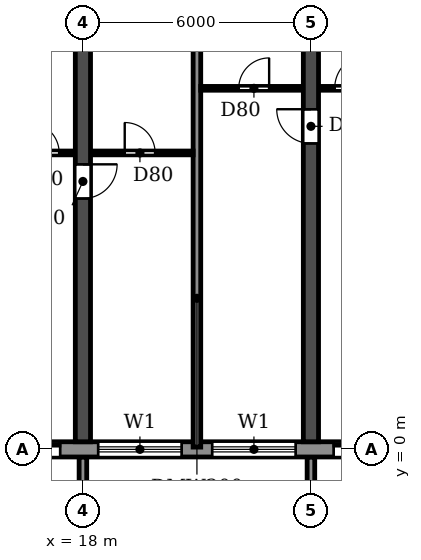
"""IFC4 building model, lengths in metres.
Left out: names, types, materials, properties, quantities, classifications, styles, units other than length and angle.
Written with IfcOpenShell. Run it as: python <this file> out.ifc"""

import sys

from ifc_helpers import new_model, si_unit, direction, frame, frame_2d, origin, place, context, subcontext, project, spatial, polyline, rectangle, outline, extrude, source, transform, mapped, element, fill, save


model = new_model("IFC4")
c1 = context("Model", 3, precision=1e-05, world=origin(), true_north=direction((0.0, 1.0)))
c2 = subcontext(c1, "Body", "Model", "MODEL_VIEW")
j1 = project(units=[si_unit("LENGTHUNIT", "METRE"), si_unit("PLANEANGLEUNIT", "RADIAN")], contexts=[c1])
p1 = place(None, origin())
s1 = spatial("IfcSite", under=j1, at=p1, CompositionType="ELEMENT")
p2 = place(p1, origin())
s2 = spatial("IfcBuilding", under=s1, at=p2, CompositionType="ELEMENT")
p3 = place(p2, frame((0.0, 0.0, 49.8)))
s3 = spatial("IfcBuildingStorey", under=s2, at=p3, CompositionType="ELEMENT", Elevation=49.8)
p4 = place(p3, frame((18.0, 0.2, 0.0), z_axis=(0.0, 0.0, 1.0), x_axis=(0.0, 1.0, 0.0)))
e1 = element("IfcWall", 1, at=p4, inside=s3, PredefinedType="SHEAR", context=c2, shape_type="SweptSolid", body=[
    extrude(rectangle(XDim=11.65, YDim=0.4, at=frame_2d((5.825, 0.0))), origin(), (0.0, 0.0, 1.0), 3.0),
])
p5 = place(p4, frame((6.4, 0.0, 0.0)))
e2 = element("IfcOpeningElement", 2, at=p5, cuts=e1, PredefinedType="OPENING", context=c2, shape_type="SweptSolid", body=[
    extrude(rectangle(XDim=0.9, YDim=2.1, at=frame_2d((0.45, 1.05))), frame((0.0, 0.21, 0.0), z_axis=(0.0, -1.0, 0.0), x_axis=(1.0, 0.0, 0.0)), (0.0, 0.0, 1.0), 0.42),
])
p6 = place(p3, frame((24.0, 0.2, 0.0), z_axis=(0.0, 0.0, 1.0), x_axis=(0.0, 1.0, 0.0)))
e3 = element("IfcWall", 3, at=p6, inside=s3, PredefinedType="SHEAR", context=c2, shape_type="SweptSolid", body=[
    extrude(rectangle(XDim=11.65, YDim=0.4, at=frame_2d((5.825, 0.0))), origin(), (0.0, 0.0, 1.0), 3.0),
])
p7 = place(p6, frame((7.85, 0.0, 0.0)))
e4 = element("IfcOpeningElement", 4, at=p7, cuts=e3, PredefinedType="OPENING", context=c2, shape_type="SweptSolid", body=[
    extrude(rectangle(XDim=0.9, YDim=2.1, at=frame_2d((0.45, 1.05))), frame((0.0, 0.21, 0.0), z_axis=(0.0, -1.0, 0.0), x_axis=(1.0, 0.0, 0.0)), (0.0, 0.0, 1.0), 0.42),
])
p8 = place(p3, frame((4.683, 0.0, 0.0), z_axis=(0.0, 0.0, 1.0), x_axis=(1.0, 0.0, 0.0)))
e5 = element("IfcWall", 5, at=p8, inside=s3, PredefinedType="STANDARD", context=c2, shape_type="SweptSolid", body=[
    extrude(rectangle(XDim=92.634, YDim=0.4, at=frame_2d((46.317, 0.0))), origin(), (0.0, 0.0, 1.0), 3.0),
])
p9 = place(p8, frame((1.717, 0.0, 0.9)))
e6 = element("IfcOpeningElement", 6, at=p9, cuts=e5, PredefinedType="OPENING", context=c2, shape_type="SweptSolid", body=[
    extrude(rectangle(XDim=2.2, YDim=1.5, at=frame_2d((1.1, 0.75))), frame((0.0, 0.21, 0.0), z_axis=(0.0, -1.0, 0.0), x_axis=(1.0, 0.0, 0.0)), (0.0, 0.0, 1.0), 0.42),
])
p10 = place(p8, frame((4.717, 0.0, 0.9)))
e7 = element("IfcOpeningElement", 7, at=p10, cuts=e5, PredefinedType="OPENING", context=c2, shape_type="SweptSolid", body=[
    extrude(rectangle(XDim=2.2, YDim=1.5, at=frame_2d((1.1, 0.75))), frame((0.0, 0.21, 0.0), z_axis=(0.0, -1.0, 0.0), x_axis=(1.0, 0.0, 0.0)), (0.0, 0.0, 1.0), 0.42),
])
p11 = place(p8, frame((7.717, 0.0, 0.9)))
e8 = element("IfcOpeningElement", 8, at=p11, cuts=e5, PredefinedType="OPENING", context=c2, shape_type="SweptSolid", body=[
    extrude(rectangle(XDim=2.2, YDim=1.5, at=frame_2d((1.1, 0.75))), frame((0.0, 0.21, 0.0), z_axis=(0.0, -1.0, 0.0), x_axis=(1.0, 0.0, 0.0)), (0.0, 0.0, 1.0), 0.42),
])
p12 = place(p8, frame((10.917, 0.0, 0.0)))
e9 = element("IfcOpeningElement", 9, at=p12, cuts=e5, PredefinedType="OPENING", context=c2, shape_type="SweptSolid", body=[
    extrude(rectangle(XDim=1.8, YDim=2.4, at=frame_2d((0.9, 1.2))), frame((0.0, 0.21, 0.0), z_axis=(0.0, -1.0, 0.0), x_axis=(1.0, 0.0, 0.0)), (0.0, 0.0, 1.0), 0.42),
])
p13 = place(p8, frame((13.717, 0.0, 0.9)))
e10 = element("IfcOpeningElement", 10, at=p13, cuts=e5, PredefinedType="OPENING", context=c2, shape_type="SweptSolid", body=[
    extrude(rectangle(XDim=2.2, YDim=1.5, at=frame_2d((1.1, 0.75))), frame((0.0, 0.21, 0.0), z_axis=(0.0, -1.0, 0.0), x_axis=(1.0, 0.0, 0.0)), (0.0, 0.0, 1.0), 0.42),
])
p14 = place(p8, frame((16.717, 0.0, 0.9)))
e11 = element("IfcOpeningElement", 11, at=p14, cuts=e5, PredefinedType="OPENING", context=c2, shape_type="SweptSolid", body=[
    extrude(rectangle(XDim=2.2, YDim=1.5, at=frame_2d((1.1, 0.75))), frame((0.0, 0.21, 0.0), z_axis=(0.0, -1.0, 0.0), x_axis=(1.0, 0.0, 0.0)), (0.0, 0.0, 1.0), 0.42),
])
p15 = place(p8, frame((19.917, 0.0, 0.0)))
e12 = element("IfcOpeningElement", 12, at=p15, cuts=e5, PredefinedType="OPENING", context=c2, shape_type="SweptSolid", body=[
    extrude(rectangle(XDim=1.8, YDim=2.4, at=frame_2d((0.9, 1.2))), frame((0.0, 0.21, 0.0), z_axis=(0.0, -1.0, 0.0), x_axis=(1.0, 0.0, 0.0)), (0.0, 0.0, 1.0), 0.42),
])
p16 = place(p8, frame((22.717, 0.0, 0.9)))
e13 = element("IfcOpeningElement", 13, at=p16, cuts=e5, PredefinedType="OPENING", context=c2, shape_type="SweptSolid", body=[
    extrude(rectangle(XDim=2.2, YDim=1.5, at=frame_2d((1.1, 0.75))), frame((0.0, 0.21, 0.0), z_axis=(0.0, -1.0, 0.0), x_axis=(1.0, 0.0, 0.0)), (0.0, 0.0, 1.0), 0.42),
])
p17 = place(p8, frame((25.717, 0.0, 0.9)))
e14 = element("IfcOpeningElement", 14, at=p17, cuts=e5, PredefinedType="OPENING", context=c2, shape_type="SweptSolid", body=[
    extrude(rectangle(XDim=2.2, YDim=1.5, at=frame_2d((1.1, 0.75))), frame((0.0, 0.21, 0.0), z_axis=(0.0, -1.0, 0.0), x_axis=(1.0, 0.0, 0.0)), (0.0, 0.0, 1.0), 0.42),
])
p18 = place(p8, frame((28.717, 0.0, 0.9)))
e15 = element("IfcOpeningElement", 15, at=p18, cuts=e5, PredefinedType="OPENING", context=c2, shape_type="SweptSolid", body=[
    extrude(rectangle(XDim=2.2, YDim=1.5, at=frame_2d((1.1, 0.75))), frame((0.0, 0.21, 0.0), z_axis=(0.0, -1.0, 0.0), x_axis=(1.0, 0.0, 0.0)), (0.0, 0.0, 1.0), 0.42),
])
p19 = place(p8, frame((31.717, 0.0, 0.9)))
e16 = element("IfcOpeningElement", 16, at=p19, cuts=e5, PredefinedType="OPENING", context=c2, shape_type="SweptSolid", body=[
    extrude(rectangle(XDim=2.2, YDim=1.5, at=frame_2d((1.1, 0.75))), frame((0.0, 0.21, 0.0), z_axis=(0.0, -1.0, 0.0), x_axis=(1.0, 0.0, 0.0)), (0.0, 0.0, 1.0), 0.42),
])
p20 = place(p8, frame((34.917, 0.0, 0.0)))
e17 = element("IfcOpeningElement", 17, at=p20, cuts=e5, PredefinedType="OPENING", context=c2, shape_type="SweptSolid", body=[
    extrude(rectangle(XDim=1.8, YDim=2.4, at=frame_2d((0.9, 1.2))), frame((0.0, 0.21, 0.0), z_axis=(0.0, -1.0, 0.0), x_axis=(1.0, 0.0, 0.0)), (0.0, 0.0, 1.0), 0.42),
])
p21 = place(p8, frame((37.717, 0.0, 0.9)))
e18 = element("IfcOpeningElement", 18, at=p21, cuts=e5, PredefinedType="OPENING", context=c2, shape_type="SweptSolid", body=[
    extrude(rectangle(XDim=2.2, YDim=1.5, at=frame_2d((1.1, 0.75))), frame((0.0, 0.21, 0.0), z_axis=(0.0, -1.0, 0.0), x_axis=(1.0, 0.0, 0.0)), (0.0, 0.0, 1.0), 0.42),
])
p22 = place(p8, frame((40.717, 0.0, 0.9)))
e19 = element("IfcOpeningElement", 19, at=p22, cuts=e5, PredefinedType="OPENING", context=c2, shape_type="SweptSolid", body=[
    extrude(rectangle(XDim=2.2, YDim=1.5, at=frame_2d((1.1, 0.75))), frame((0.0, 0.21, 0.0), z_axis=(0.0, -1.0, 0.0), x_axis=(1.0, 0.0, 0.0)), (0.0, 0.0, 1.0), 0.42),
])
p23 = place(p8, frame((43.717, 0.0, 0.9)))
e20 = element("IfcOpeningElement", 20, at=p23, cuts=e5, PredefinedType="OPENING", context=c2, shape_type="SweptSolid", body=[
    extrude(rectangle(XDim=2.2, YDim=1.5, at=frame_2d((1.1, 0.75))), frame((0.0, 0.21, 0.0), z_axis=(0.0, -1.0, 0.0), x_axis=(1.0, 0.0, 0.0)), (0.0, 0.0, 1.0), 0.42),
])
p24 = place(p8, frame((46.917, 0.0, 0.0)))
e21 = element("IfcOpeningElement", 21, at=p24, cuts=e5, PredefinedType="OPENING", context=c2, shape_type="SweptSolid", body=[
    extrude(rectangle(XDim=1.8, YDim=2.4, at=frame_2d((0.9, 1.2))), frame((0.0, 0.21, 0.0), z_axis=(0.0, -1.0, 0.0), x_axis=(1.0, 0.0, 0.0)), (0.0, 0.0, 1.0), 0.42),
])
p25 = place(p8, frame((49.717, 0.0, 0.9)))
e22 = element("IfcOpeningElement", 22, at=p25, cuts=e5, PredefinedType="OPENING", context=c2, shape_type="SweptSolid", body=[
    extrude(rectangle(XDim=2.2, YDim=1.5, at=frame_2d((1.1, 0.75))), frame((0.0, 0.21, 0.0), z_axis=(0.0, -1.0, 0.0), x_axis=(1.0, 0.0, 0.0)), (0.0, 0.0, 1.0), 0.42),
])
p26 = place(p8, frame((52.717, 0.0, 0.9)))
e23 = element("IfcOpeningElement", 23, at=p26, cuts=e5, PredefinedType="OPENING", context=c2, shape_type="SweptSolid", body=[
    extrude(rectangle(XDim=2.2, YDim=1.5, at=frame_2d((1.1, 0.75))), frame((0.0, 0.21, 0.0), z_axis=(0.0, -1.0, 0.0), x_axis=(1.0, 0.0, 0.0)), (0.0, 0.0, 1.0), 0.42),
])
p27 = place(p8, frame((55.717, 0.0, 0.9)))
e24 = element("IfcOpeningElement", 24, at=p27, cuts=e5, PredefinedType="OPENING", context=c2, shape_type="SweptSolid", body=[
    extrude(rectangle(XDim=2.2, YDim=1.5, at=frame_2d((1.1, 0.75))), frame((0.0, 0.21, 0.0), z_axis=(0.0, -1.0, 0.0), x_axis=(1.0, 0.0, 0.0)), (0.0, 0.0, 1.0), 0.42),
])
p28 = place(p8, frame((58.917, 0.0, 0.0)))
e25 = element("IfcOpeningElement", 25, at=p28, cuts=e5, PredefinedType="OPENING", context=c2, shape_type="SweptSolid", body=[
    extrude(rectangle(XDim=1.8, YDim=2.4, at=frame_2d((0.9, 1.2))), frame((0.0, 0.21, 0.0), z_axis=(0.0, -1.0, 0.0), x_axis=(1.0, 0.0, 0.0)), (0.0, 0.0, 1.0), 0.42),
])
p29 = place(p8, frame((61.717, 0.0, 0.9)))
e26 = element("IfcOpeningElement", 26, at=p29, cuts=e5, PredefinedType="OPENING", context=c2, shape_type="SweptSolid", body=[
    extrude(rectangle(XDim=2.2, YDim=1.5, at=frame_2d((1.1, 0.75))), frame((0.0, 0.21, 0.0), z_axis=(0.0, -1.0, 0.0), x_axis=(1.0, 0.0, 0.0)), (0.0, 0.0, 1.0), 0.42),
])
p30 = place(p8, frame((64.717, 0.0, 0.9)))
e27 = element("IfcOpeningElement", 27, at=p30, cuts=e5, PredefinedType="OPENING", context=c2, shape_type="SweptSolid", body=[
    extrude(rectangle(XDim=2.2, YDim=1.5, at=frame_2d((1.1, 0.75))), frame((0.0, 0.21, 0.0), z_axis=(0.0, -1.0, 0.0), x_axis=(1.0, 0.0, 0.0)), (0.0, 0.0, 1.0), 0.42),
])
p31 = place(p8, frame((67.717, 0.0, 0.9)))
e28 = element("IfcOpeningElement", 28, at=p31, cuts=e5, PredefinedType="OPENING", context=c2, shape_type="SweptSolid", body=[
    extrude(rectangle(XDim=2.2, YDim=1.5, at=frame_2d((1.1, 0.75))), frame((0.0, 0.21, 0.0), z_axis=(0.0, -1.0, 0.0), x_axis=(1.0, 0.0, 0.0)), (0.0, 0.0, 1.0), 0.42),
])
p32 = place(p8, frame((70.917, 0.0, 0.0)))
e29 = element("IfcOpeningElement", 29, at=p32, cuts=e5, PredefinedType="OPENING", context=c2, shape_type="SweptSolid", body=[
    extrude(rectangle(XDim=1.8, YDim=2.4, at=frame_2d((0.9, 1.2))), frame((0.0, 0.21, 0.0), z_axis=(0.0, -1.0, 0.0), x_axis=(1.0, 0.0, 0.0)), (0.0, 0.0, 1.0), 0.42),
])
p33 = place(p8, frame((73.717, 0.0, 0.9)))
e30 = element("IfcOpeningElement", 30, at=p33, cuts=e5, PredefinedType="OPENING", context=c2, shape_type="SweptSolid", body=[
    extrude(rectangle(XDim=2.2, YDim=1.5, at=frame_2d((1.1, 0.75))), frame((0.0, 0.21, 0.0), z_axis=(0.0, -1.0, 0.0), x_axis=(1.0, 0.0, 0.0)), (0.0, 0.0, 1.0), 0.42),
])
p34 = place(p8, frame((76.717, 0.0, 0.9)))
e31 = element("IfcOpeningElement", 31, at=p34, cuts=e5, PredefinedType="OPENING", context=c2, shape_type="SweptSolid", body=[
    extrude(rectangle(XDim=2.2, YDim=1.5, at=frame_2d((1.1, 0.75))), frame((0.0, 0.21, 0.0), z_axis=(0.0, -1.0, 0.0), x_axis=(1.0, 0.0, 0.0)), (0.0, 0.0, 1.0), 0.42),
])
p35 = place(p8, frame((79.717, 0.0, 0.9)))
e32 = element("IfcOpeningElement", 32, at=p35, cuts=e5, PredefinedType="OPENING", context=c2, shape_type="SweptSolid", body=[
    extrude(rectangle(XDim=2.2, YDim=1.5, at=frame_2d((1.1, 0.75))), frame((0.0, 0.21, 0.0), z_axis=(0.0, -1.0, 0.0), x_axis=(1.0, 0.0, 0.0)), (0.0, 0.0, 1.0), 0.42),
])
p36 = place(p8, frame((82.917, 0.0, 0.0)))
e33 = element("IfcOpeningElement", 33, at=p36, cuts=e5, PredefinedType="OPENING", context=c2, shape_type="SweptSolid", body=[
    extrude(rectangle(XDim=1.8, YDim=2.4, at=frame_2d((0.9, 1.2))), frame((0.0, 0.21, 0.0), z_axis=(0.0, -1.0, 0.0), x_axis=(1.0, 0.0, 0.0)), (0.0, 0.0, 1.0), 0.42),
])
p37 = place(p8, frame((85.717, 0.0, 0.9)))
e34 = element("IfcOpeningElement", 34, at=p37, cuts=e5, PredefinedType="OPENING", context=c2, shape_type="SweptSolid", body=[
    extrude(rectangle(XDim=2.2, YDim=1.5, at=frame_2d((1.1, 0.75))), frame((0.0, 0.21, 0.0), z_axis=(0.0, -1.0, 0.0), x_axis=(1.0, 0.0, 0.0)), (0.0, 0.0, 1.0), 0.42),
])
p38 = place(p8, frame((88.717, 0.0, 0.9)))
e35 = element("IfcOpeningElement", 35, at=p38, cuts=e5, PredefinedType="OPENING", context=c2, shape_type="SweptSolid", body=[
    extrude(rectangle(XDim=2.2, YDim=1.5, at=frame_2d((1.1, 0.75))), frame((0.0, 0.21, 0.0), z_axis=(0.0, -1.0, 0.0), x_axis=(1.0, 0.0, 0.0)), (0.0, 0.0, 1.0), 0.42),
])
m1 = source(origin(), c2, "Body", "SweptSolid", [
    extrude(outline(polyline([(0.0, 0.0), (0.2, 0.0), (0.2, 1.65), (0.0, 1.65), (0.0, 0.0)])), origin(), (0.0, 0.0, 1.0), 3.1),
])
for number, where in (
    (36, (17.9, -1.85, 0.0)),
    (37, (23.9, -1.85, 0.0)),
):
    element("IfcWall", number, at=place(p3, frame(where)), inside=s3, PredefinedType="STANDARD", context=c2, shape_type="MappedRepresentation", body=[
        mapped(m1, transform((0.0, 0.0, 0.0))),
    ])
p39 = place(p3, frame((21.0, 0.06, 0.0), z_axis=(0.0, 0.0, 1.0), x_axis=(0.0, 1.0, 0.0)))
e38 = element("IfcWall", 38, at=p39, inside=s3, PredefinedType="PARTITIONING", context=c2, shape_type="SweptSolid", body=[
    extrude(rectangle(XDim=11.78, YDim=0.2, at=frame_2d((5.89, 0.0))), origin(), (0.0, 0.0, 1.0), 3.0),
])
p40 = place(p3, frame((15.9, 7.8, 0.0), z_axis=(0.0, 0.0, 1.0), x_axis=(1.0, 0.0, 0.0)))
e39 = element("IfcWall", 39, at=p40, inside=s3, PredefinedType="PARTITIONING", context=c2, shape_type="SweptSolid", body=[
    extrude(rectangle(XDim=1.89, YDim=0.1, at=frame_2d((0.945, 0.0))), origin(), (0.0, 0.0, 1.0), 3.0),
])
p41 = place(p40, frame((0.675, 0.0, 0.0)))
e40 = element("IfcOpeningElement", 40, at=p41, cuts=e39, PredefinedType="OPENING", context=c2, shape_type="SweptSolid", body=[
    extrude(rectangle(XDim=0.8, YDim=2.1, at=frame_2d((0.4, 1.05))), frame((0.0, 0.06, 0.0), z_axis=(0.0, -1.0, 0.0), x_axis=(1.0, 0.0, 0.0)), (0.0, 0.0, 1.0), 0.12),
])
p42 = place(p3, frame((18.21, 7.8, 0.0), z_axis=(0.0, 0.0, 1.0), x_axis=(1.0, 0.0, 0.0)))
e41 = element("IfcWall", 41, at=p42, inside=s3, PredefinedType="PARTITIONING", context=c2, shape_type="SweptSolid", body=[
    extrude(rectangle(XDim=2.69, YDim=0.1, at=frame_2d((1.345, 0.0))), origin(), (0.0, 0.0, 1.0), 3.0),
])
p43 = place(p42, frame((0.89, 0.0, 0.0)))
e42 = element("IfcOpeningElement", 42, at=p43, cuts=e41, PredefinedType="OPENING", context=c2, shape_type="SweptSolid", body=[
    extrude(rectangle(XDim=0.8, YDim=2.1, at=frame_2d((0.4, 1.05))), frame((0.0, 0.06, 0.0), z_axis=(0.0, -1.0, 0.0), x_axis=(1.0, 0.0, 0.0)), (0.0, 0.0, 1.0), 0.12),
])
p44 = place(p3, frame((21.1, 9.5, 0.0), z_axis=(0.0, 0.0, 1.0), x_axis=(1.0, 0.0, 0.0)))
e43 = element("IfcWall", 43, at=p44, inside=s3, PredefinedType="PARTITIONING", context=c2, shape_type="SweptSolid", body=[
    extrude(rectangle(XDim=2.69, YDim=0.1, at=frame_2d((1.345, 0.0))), origin(), (0.0, 0.0, 1.0), 3.0),
])
p45 = place(p44, frame((1.0, 0.0, 0.0)))
e44 = element("IfcOpeningElement", 44, at=p45, cuts=e43, PredefinedType="OPENING", context=c2, shape_type="SweptSolid", body=[
    extrude(rectangle(XDim=0.8, YDim=2.1, at=frame_2d((0.4, 1.05))), frame((0.0, 0.06, 0.0), z_axis=(0.0, -1.0, 0.0), x_axis=(1.0, 0.0, 0.0)), (0.0, 0.0, 1.0), 0.12),
])
p46 = place(p3, frame((24.21, 9.5, 0.0), z_axis=(0.0, 0.0, 1.0), x_axis=(1.0, 0.0, 0.0)))
e45 = element("IfcWall", 45, at=p46, inside=s3, PredefinedType="PARTITIONING", context=c2, shape_type="SweptSolid", body=[
    extrude(rectangle(XDim=1.99, YDim=0.1, at=frame_2d((0.995, 0.0))), origin(), (0.0, 0.0, 1.0), 3.0),
])
p47 = place(p46, frame((0.415, 0.0, 0.0)))
e46 = element("IfcOpeningElement", 46, at=p47, cuts=e45, PredefinedType="OPENING", context=c2, shape_type="SweptSolid", body=[
    extrude(rectangle(XDim=0.9, YDim=2.1, at=frame_2d((0.45, 1.05))), frame((0.0, 0.06, 0.0), z_axis=(0.0, -1.0, 0.0), x_axis=(1.0, 0.0, 0.0)), (0.0, 0.0, 1.0), 0.12),
])
p48 = place(p12, origin())
e47 = element("IfcDoor", 47, at=p48, inside=s3, OperationType="DOUBLE_DOOR_SLIDING", PredefinedType="DOOR", context=c2, shape_type="SweptSolid", body=[
    extrude(rectangle(XDim=1.8, YDim=2.4, at=frame_2d((0.9, 1.2))), frame((0.0, 0.025, 0.0), z_axis=(0.0, -1.0, 0.0), x_axis=(1.0, 0.0, 0.0)), (0.0, 0.0, 1.0), 0.05),
])
fill(e9, e47)
p49 = place(p13, origin())
e48 = element("IfcWindow", 48, at=p49, inside=s3, PartitioningType="DOUBLE_PANEL_HORIZONTAL", PredefinedType="WINDOW", context=c2, shape_type="SweptSolid", body=[
    extrude(rectangle(XDim=2.2, YDim=1.5, at=frame_2d((1.1, 0.75))), frame((0.0, 0.03, 0.0), z_axis=(0.0, -1.0, 0.0), x_axis=(1.0, 0.0, 0.0)), (0.0, 0.0, 1.0), 0.06),
])
fill(e10, e48)
p50 = place(p14, origin())
e49 = element("IfcWindow", 49, at=p50, inside=s3, PartitioningType="DOUBLE_PANEL_HORIZONTAL", PredefinedType="WINDOW", context=c2, shape_type="SweptSolid", body=[
    extrude(rectangle(XDim=2.2, YDim=1.5, at=frame_2d((1.1, 0.75))), frame((0.0, 0.03, 0.0), z_axis=(0.0, -1.0, 0.0), x_axis=(1.0, 0.0, 0.0)), (0.0, 0.0, 1.0), 0.06),
])
fill(e11, e49)
p51 = place(p15, origin())
e50 = element("IfcDoor", 50, at=p51, inside=s3, OperationType="DOUBLE_DOOR_SLIDING", PredefinedType="DOOR", context=c2, shape_type="SweptSolid", body=[
    extrude(rectangle(XDim=1.8, YDim=2.4, at=frame_2d((0.9, 1.2))), frame((0.0, 0.025, 0.0), z_axis=(0.0, -1.0, 0.0), x_axis=(1.0, 0.0, 0.0)), (0.0, 0.0, 1.0), 0.05),
])
fill(e12, e50)
p52 = place(p43, origin())
e51 = element("IfcDoor", 51, at=p52, inside=s3, OperationType="SINGLE_SWING_LEFT", PredefinedType="DOOR", context=c2, shape_type="SweptSolid", body=[
    extrude(rectangle(XDim=0.8, YDim=2.1, at=frame_2d((0.4, 1.05))), frame((0.0, 0.025, 0.0), z_axis=(0.0, -1.0, 0.0), x_axis=(1.0, 0.0, 0.0)), (0.0, 0.0, 1.0), 0.05),
])
fill(e42, e51)
p53 = place(p41, origin())
e52 = element("IfcDoor", 52, at=p53, inside=s3, OperationType="SINGLE_SWING_LEFT", PredefinedType="DOOR", context=c2, shape_type="SweptSolid", body=[
    extrude(rectangle(XDim=0.8, YDim=2.1, at=frame_2d((0.4, 1.05))), frame((0.0, 0.025, 0.0), z_axis=(0.0, -1.0, 0.0), x_axis=(1.0, 0.0, 0.0)), (0.0, 0.0, 1.0), 0.05),
])
fill(e40, e52)
p54 = place(p5, frame((0.9, 0.0, 0.0), z_axis=(0.0, 0.0, 1.0), x_axis=(-1.0, 0.0, 0.0)))
e53 = element("IfcDoor", 53, at=p54, inside=s3, OperationType="SINGLE_SWING_LEFT", PredefinedType="DOOR", context=c2, shape_type="SweptSolid", body=[
    extrude(rectangle(XDim=0.9, YDim=2.1, at=frame_2d((0.45, 1.05))), frame((0.0, 0.025, 0.0), z_axis=(0.0, -1.0, 0.0), x_axis=(1.0, 0.0, 0.0)), (0.0, 0.0, 1.0), 0.05),
])
fill(e2, e53)
p55 = place(p45, origin())
e54 = element("IfcDoor", 54, at=p55, inside=s3, OperationType="SINGLE_SWING_RIGHT", PredefinedType="DOOR", context=c2, shape_type="SweptSolid", body=[
    extrude(rectangle(XDim=0.8, YDim=2.1, at=frame_2d((0.4, 1.05))), frame((0.0, 0.025, 0.0), z_axis=(0.0, -1.0, 0.0), x_axis=(1.0, 0.0, 0.0)), (0.0, 0.0, 1.0), 0.05),
])
fill(e44, e54)
p56 = place(p7, origin())
e55 = element("IfcDoor", 55, at=p56, inside=s3, OperationType="SINGLE_SWING_RIGHT", PredefinedType="DOOR", context=c2, shape_type="SweptSolid", body=[
    extrude(rectangle(XDim=0.9, YDim=2.1, at=frame_2d((0.45, 1.05))), frame((0.0, 0.025, 0.0), z_axis=(0.0, -1.0, 0.0), x_axis=(1.0, 0.0, 0.0)), (0.0, 0.0, 1.0), 0.05),
])
fill(e4, e55)
p57 = place(p47, origin())
e56 = element("IfcDoor", 56, at=p57, inside=s3, OperationType="SINGLE_SWING_RIGHT", PredefinedType="DOOR", context=c2, shape_type="SweptSolid", body=[
    extrude(rectangle(XDim=0.9, YDim=2.1, at=frame_2d((0.45, 1.05))), frame((0.0, 0.025, 0.0), z_axis=(0.0, -1.0, 0.0), x_axis=(1.0, 0.0, 0.0)), (0.0, 0.0, 1.0), 0.05),
])
fill(e46, e56)
save(model, sys.argv[1])
